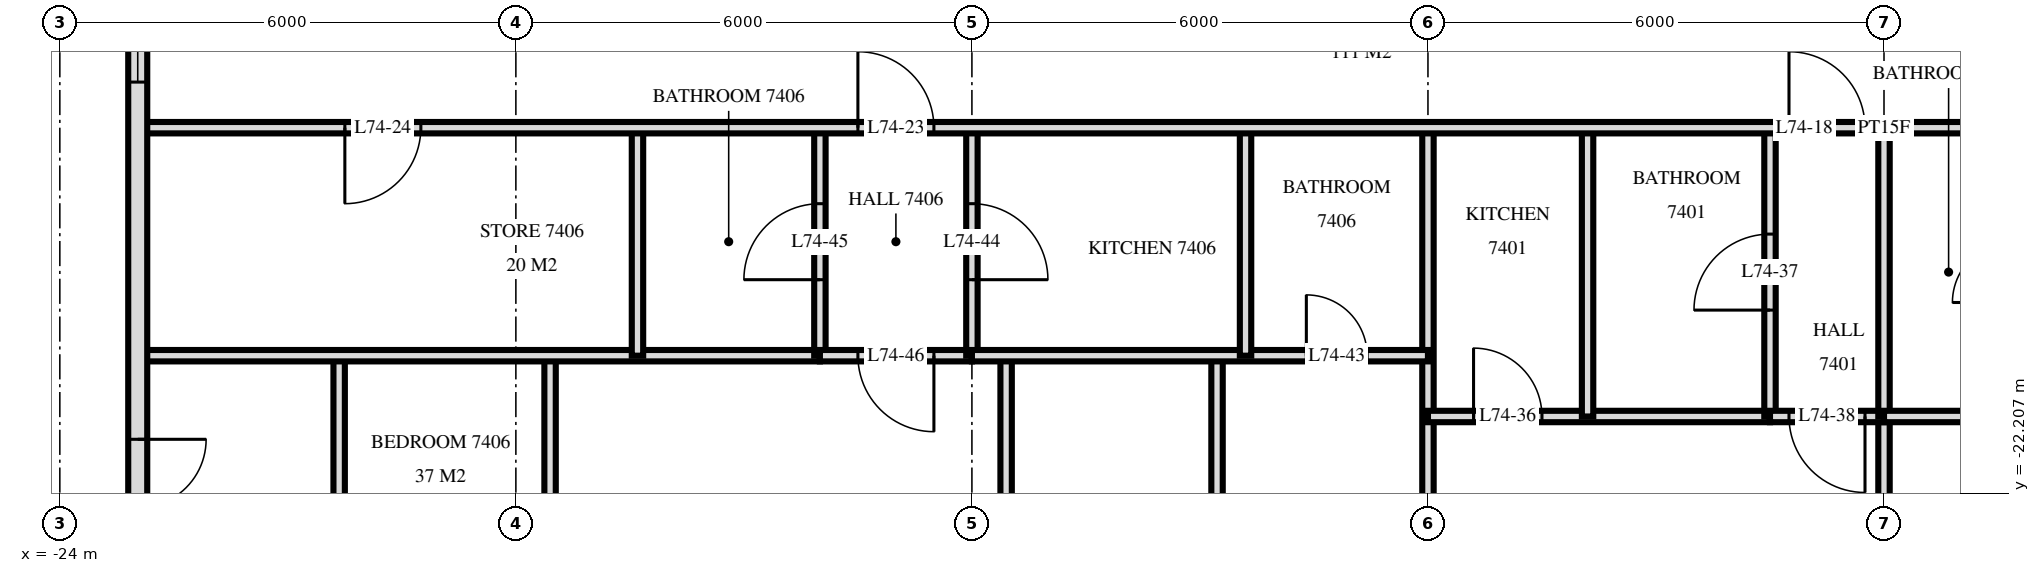
"""IFC4 building model, lengths in metres.
Left out: names, types, materials, properties, quantities, classifications, styles, units other than length and angle.
Written with IfcOpenShell. Run it as: python <this file> out.ifc"""

import sys

from ifc_helpers import new_model, si_unit, direction, frame, frame_2d, origin, place, context, subcontext, project, spatial, rectangle, extrude, element, fill, save


model = new_model("IFC4")
c1 = context("Model", 3, precision=1e-05, world=origin(), true_north=direction((0.0, 1.0)))
c2 = subcontext(c1, "Body", "Model", "MODEL_VIEW")
j1 = project(units=[si_unit("LENGTHUNIT", "METRE"), si_unit("PLANEANGLEUNIT", "RADIAN")], contexts=[c1])
p1 = place(None, origin())
s1 = spatial("IfcSite", under=j1, at=p1, CompositionType="ELEMENT")
p2 = place(p1, origin())
s2 = spatial("IfcBuilding", under=s1, at=p2, CompositionType="ELEMENT")
p3 = place(p2, frame((0.0, 0.0, 280.6)))
s3 = spatial("IfcBuildingStorey", under=s2, at=p3, CompositionType="ELEMENT", Elevation=280.6)
p4 = place(p3, frame((-22.975, -3.325, 0.0), z_axis=(0.0, 0.0, 1.0), x_axis=(0.0, -1.0, 0.0)))
e1 = element("IfcWall", 1, at=p4, inside=s3, PredefinedType="SOLIDWALL", context=c2, shape_type="SweptSolid", body=[
    extrude(rectangle(XDim=25.951, YDim=0.25, at=frame_2d((12.975, 0.0))), origin(), (0.0, 0.0, 1.0), 3.22),
])
p5 = place(p4, frame((3.225, 0.0, 0.0)))
e2 = element("IfcOpeningElement", 2, at=p5, cuts=e1, PredefinedType="OPENING", context=c2, shape_type="SweptSolid", body=[
    extrude(rectangle(XDim=1.8, YDim=2.4, at=frame_2d((0.9, 1.2))), frame((0.0, 0.135, 0.0), z_axis=(0.0, -1.0, 0.0), x_axis=(1.0, 0.0, 0.0)), (0.0, 0.0, 1.0), 0.27),
])
p6 = place(p4, frame((7.975, 0.0, 0.0)))
e3 = element("IfcOpeningElement", 3, at=p6, cuts=e1, PredefinedType="OPENING", context=c2, shape_type="SweptSolid", body=[
    extrude(rectangle(XDim=1.8, YDim=2.4, at=frame_2d((0.9, 1.2))), frame((0.0, 0.135, 0.0), z_axis=(0.0, -1.0, 0.0), x_axis=(1.0, 0.0, 0.0)), (0.0, 0.0, 1.0), 0.27),
])
p7 = place(p4, frame((12.275, 0.0, 0.9)))
e4 = element("IfcOpeningElement", 4, at=p7, cuts=e1, PredefinedType="OPENING", context=c2, shape_type="SweptSolid", body=[
    extrude(rectangle(XDim=1.2, YDim=1.5, at=frame_2d((0.6, 0.75))), frame((0.0, 0.135, 0.0), z_axis=(0.0, -1.0, 0.0), x_axis=(1.0, 0.0, 0.0)), (0.0, 0.0, 1.0), 0.27),
])
p8 = place(p4, frame((18.175, 0.0, 0.0)))
e5 = element("IfcOpeningElement", 5, at=p8, cuts=e1, PredefinedType="OPENING", context=c2, shape_type="SweptSolid", body=[
    extrude(rectangle(XDim=1.8, YDim=2.4, at=frame_2d((0.9, 1.2))), frame((0.0, 0.135, 0.0), z_axis=(0.0, -1.0, 0.0), x_axis=(1.0, 0.0, 0.0)), (0.0, 0.0, 1.0), 0.27),
])
p9 = place(p4, frame((21.075, 0.0, 0.0)))
e6 = element("IfcOpeningElement", 6, at=p9, cuts=e1, PredefinedType="OPENING", context=c2, shape_type="SweptSolid", body=[
    extrude(rectangle(XDim=1.8, YDim=2.4, at=frame_2d((0.9, 1.2))), frame((0.0, 0.135, 0.0), z_axis=(0.0, -1.0, 0.0), x_axis=(1.0, 0.0, 0.0)), (0.0, 0.0, 1.0), 0.27),
])
p10 = place(p4, frame((23.825, 0.0, 0.9)))
e7 = element("IfcOpeningElement", 7, at=p10, cuts=e1, PredefinedType="OPENING", context=c2, shape_type="SweptSolid", body=[
    extrude(rectangle(XDim=1.8, YDim=1.5, at=frame_2d((0.9, 0.75))), frame((0.0, 0.135, 0.0), z_axis=(0.0, -1.0, 0.0), x_axis=(1.0, 0.0, 0.0)), (0.0, 0.0, 1.0), 0.27),
])
p11 = place(p3, frame((0.0, -21.2, 0.0), z_axis=(0.0, 0.0, 1.0), x_axis=(0.0, 1.0, 0.0)))
e8 = element("IfcWall", 8, at=p11, inside=s3, PredefinedType="PARTITIONING", context=c2, shape_type="SweptSolid", body=[
    extrude(rectangle(XDim=3.8, YDim=0.15, at=frame_2d((1.9, 0.0))), origin(), (0.0, 0.0, 1.0), 3.22),
])
p12 = place(p3, frame((0.0, -33.62, 0.0), z_axis=(0.0, 0.0, 1.0), x_axis=(0.0, 1.0, 0.0)))
e9 = element("IfcWall", 9, at=p12, inside=s3, PredefinedType="PARTITIONING", context=c2, shape_type="SweptSolid", body=[
    extrude(rectangle(XDim=12.42, YDim=0.15, at=frame_2d((6.21, 0.0))), origin(), (0.0, 0.0, 1.0), 3.22),
])
p13 = place(p3, frame((-1.5, -21.2, 0.0), z_axis=(0.0, 0.0, 1.0), x_axis=(0.0, 1.0, 0.0)))
e10 = element("IfcWall", 10, at=p13, inside=s3, PredefinedType="PARTITIONING", context=c2, shape_type="SweptSolid", body=[
    extrude(rectangle(XDim=3.8, YDim=0.15, at=frame_2d((1.9, 0.0))), origin(), (0.0, 0.0, 1.0), 3.22),
])
p14 = place(p13, frame((1.4, 0.0, 0.0)))
e11 = element("IfcOpeningElement", 11, at=p14, cuts=e10, PredefinedType="OPENING", context=c2, shape_type="SweptSolid", body=[
    extrude(rectangle(XDim=1.0, YDim=2.1, at=frame_2d((0.5, 1.05))), frame((0.0, 0.085, 0.0), z_axis=(0.0, -1.0, 0.0), x_axis=(1.0, 0.0, 0.0)), (0.0, 0.0, 1.0), 0.17),
])
p15 = place(p3, frame((-3.9, -21.2, 0.0), z_axis=(0.0, 0.0, 1.0), x_axis=(0.0, 1.0, 0.0)))
e12 = element("IfcWall", 12, at=p15, inside=s3, PredefinedType="PARTITIONING", context=c2, shape_type="SweptSolid", body=[
    extrude(rectangle(XDim=3.8, YDim=0.15, at=frame_2d((1.9, 0.0))), origin(), (0.0, 0.0, 1.0), 3.22),
])
p16 = place(p3, frame((-6.0, -33.62, 0.0), z_axis=(0.0, 0.0, 1.0), x_axis=(0.0, 1.0, 0.0)))
e13 = element("IfcWall", 13, at=p16, inside=s3, PredefinedType="PARTITIONING", context=c2, shape_type="SweptSolid", body=[
    extrude(rectangle(XDim=16.22, YDim=0.15, at=frame_2d((8.11, 0.0))), origin(), (0.0, 0.0, 1.0), 3.22),
])
p17 = place(p3, frame((-8.4, -20.4, 0.0), z_axis=(0.0, 0.0, 1.0), x_axis=(0.0, 1.0, 0.0)))
e14 = element("IfcWall", 14, at=p17, inside=s3, PredefinedType="PARTITIONING", context=c2, shape_type="SweptSolid", body=[
    extrude(rectangle(XDim=3.0, YDim=0.15, at=frame_2d((1.5, 0.0))), origin(), (0.0, 0.0, 1.0), 3.22),
])
p18 = place(p3, frame((-8.775, -33.62, 0.0), z_axis=(0.0, 0.0, 1.0), x_axis=(0.0, 1.0, 0.0)))
e15 = element("IfcWall", 15, at=p18, inside=s3, PredefinedType="PARTITIONING", context=c2, shape_type="SweptSolid", body=[
    extrude(rectangle(XDim=13.22, YDim=0.15, at=frame_2d((6.61, 0.0))), origin(), (0.0, 0.0, 1.0), 3.22),
])
p19 = place(p18, frame((6.07, 0.0, 0.0)))
e16 = element("IfcOpeningElement", 16, at=p19, cuts=e15, PredefinedType="OPENING", context=c2, shape_type="SweptSolid", body=[
    extrude(rectangle(XDim=0.9, YDim=2.1, at=frame_2d((0.45, 1.05))), frame((0.0, 0.085, 0.0), z_axis=(0.0, -1.0, 0.0), x_axis=(1.0, 0.0, 0.0)), (0.0, 0.0, 1.0), 0.17),
])
p20 = place(p3, frame((-11.55, -33.62, 0.0), z_axis=(0.0, 0.0, 1.0), x_axis=(0.0, 1.0, 0.0)))
e17 = element("IfcWall", 17, at=p20, inside=s3, PredefinedType="PARTITIONING", context=c2, shape_type="SweptSolid", body=[
    extrude(rectangle(XDim=13.22, YDim=0.15, at=frame_2d((6.61, 0.0))), origin(), (0.0, 0.0, 1.0), 3.22),
])
p21 = place(p20, frame((6.05, 0.0, 0.0)))
e18 = element("IfcOpeningElement", 18, at=p21, cuts=e17, PredefinedType="OPENING", context=c2, shape_type="SweptSolid", body=[
    extrude(rectangle(XDim=0.9, YDim=2.1, at=frame_2d((0.45, 1.05))), frame((0.0, 0.085, 0.0), z_axis=(0.0, -1.0, 0.0), x_axis=(1.0, 0.0, 0.0)), (0.0, 0.0, 1.0), 0.17),
])
p22 = place(p3, frame((-12.0, -20.4, 0.0), z_axis=(0.0, 0.0, 1.0), x_axis=(0.0, 1.0, 0.0)))
e19 = element("IfcWall", 19, at=p22, inside=s3, PredefinedType="PARTITIONING", context=c2, shape_type="SweptSolid", body=[
    extrude(rectangle(XDim=3.0, YDim=0.15, at=frame_2d((1.5, 0.0))), origin(), (0.0, 0.0, 1.0), 3.22),
])
p23 = place(p22, frame((1.0, 0.0, 0.0)))
e20 = element("IfcOpeningElement", 20, at=p23, cuts=e19, PredefinedType="OPENING", context=c2, shape_type="SweptSolid", body=[
    extrude(rectangle(XDim=1.0, YDim=2.1, at=frame_2d((0.5, 1.05))), frame((0.0, 0.085, 0.0), z_axis=(0.0, -1.0, 0.0), x_axis=(1.0, 0.0, 0.0)), (0.0, 0.0, 1.0), 0.17),
])
p24 = place(p3, frame((-14.0, -20.4, 0.0), z_axis=(0.0, 0.0, 1.0), x_axis=(0.0, 1.0, 0.0)))
e21 = element("IfcWall", 21, at=p24, inside=s3, PredefinedType="PARTITIONING", context=c2, shape_type="SweptSolid", body=[
    extrude(rectangle(XDim=3.0, YDim=0.15, at=frame_2d((1.5, 0.0))), origin(), (0.0, 0.0, 1.0), 3.22),
])
p25 = place(p24, frame((1.0, 0.0, 0.0)))
e22 = element("IfcOpeningElement", 22, at=p25, cuts=e21, PredefinedType="OPENING", context=c2, shape_type="SweptSolid", body=[
    extrude(rectangle(XDim=1.0, YDim=2.1, at=frame_2d((0.5, 1.05))), frame((0.0, 0.085, 0.0), z_axis=(0.0, -1.0, 0.0), x_axis=(1.0, 0.0, 0.0)), (0.0, 0.0, 1.0), 0.17),
])
p26 = place(p3, frame((-16.4, -20.4, 0.0), z_axis=(0.0, 0.0, 1.0), x_axis=(0.0, 1.0, 0.0)))
e23 = element("IfcWall", 23, at=p26, inside=s3, PredefinedType="PARTITIONING", context=c2, shape_type="SweptSolid", body=[
    extrude(rectangle(XDim=3.0, YDim=0.15, at=frame_2d((1.5, 0.0))), origin(), (0.0, 0.0, 1.0), 3.22),
])
p27 = place(p3, frame((-17.55, -33.62, 0.0), z_axis=(0.0, 0.0, 1.0), x_axis=(0.0, 1.0, 0.0)))
e24 = element("IfcWall", 24, at=p27, inside=s3, PredefinedType="PARTITIONING", context=c2, shape_type="SweptSolid", body=[
    extrude(rectangle(XDim=13.22, YDim=0.15, at=frame_2d((6.61, 0.0))), origin(), (0.0, 0.0, 1.0), 3.22),
])
p28 = place(p27, frame((6.09, 0.0, 0.0)))
e25 = element("IfcOpeningElement", 25, at=p28, cuts=e24, PredefinedType="OPENING", context=c2, shape_type="SweptSolid", body=[
    extrude(rectangle(XDim=0.9, YDim=2.1, at=frame_2d((0.45, 1.05))), frame((0.0, 0.085, 0.0), z_axis=(0.0, -1.0, 0.0), x_axis=(1.0, 0.0, 0.0)), (0.0, 0.0, 1.0), 0.17),
])
p29 = place(p3, frame((-20.325, -33.239, 0.0), z_axis=(0.0, 0.0, 1.0), x_axis=(0.0, 1.0, 0.0)))
e26 = element("IfcWall", 26, at=p29, inside=s3, PredefinedType="PARTITIONING", context=c2, shape_type="SweptSolid", body=[
    extrude(rectangle(XDim=12.839, YDim=0.15, at=frame_2d((6.419, 0.0))), origin(), (0.0, 0.0, 1.0), 3.22),
])
p30 = place(p29, frame((5.853, 0.0, 0.0)))
e27 = element("IfcOpeningElement", 27, at=p30, cuts=e26, PredefinedType="OPENING", context=c2, shape_type="SweptSolid", body=[
    extrude(rectangle(XDim=0.9, YDim=2.1, at=frame_2d((0.45, 1.05))), frame((0.0, 0.085, 0.0), z_axis=(0.0, -1.0, 0.0), x_axis=(1.0, 0.0, 0.0)), (0.0, 0.0, 1.0), 0.17),
])
p31 = place(p3, frame((-1.5, -21.2, 0.0), z_axis=(0.0, 0.0, 1.0), x_axis=(1.0, 0.0, 0.0)))
e28 = element("IfcWall", 28, at=p31, inside=s3, PredefinedType="PARTITIONING", context=c2, shape_type="SweptSolid", body=[
    extrude(rectangle(XDim=1.5, YDim=0.15, at=frame_2d((0.75, 0.0))), origin(), (0.0, 0.0, 1.0), 3.22),
])
p32 = place(p31, frame((0.25, 0.0, 0.0)))
e29 = element("IfcOpeningElement", 29, at=p32, cuts=e28, PredefinedType="OPENING", context=c2, shape_type="SweptSolid", body=[
    extrude(rectangle(XDim=1.0, YDim=2.1, at=frame_2d((0.5, 1.05))), frame((0.0, 0.085, 0.0), z_axis=(0.0, -1.0, 0.0), x_axis=(1.0, 0.0, 0.0)), (0.0, 0.0, 1.0), 0.17),
])
p33 = place(p3, frame((-6.0, -21.2, 0.0), z_axis=(0.0, 0.0, 1.0), x_axis=(1.0, 0.0, 0.0)))
e30 = element("IfcWall", 30, at=p33, inside=s3, PredefinedType="PARTITIONING", context=c2, shape_type="SweptSolid", body=[
    extrude(rectangle(XDim=4.5, YDim=0.15, at=frame_2d((2.25, 0.0))), origin(), (0.0, 0.0, 1.0), 3.22),
])
p34 = place(p33, frame((0.6, 0.0, 0.0)))
e31 = element("IfcOpeningElement", 31, at=p34, cuts=e30, PredefinedType="OPENING", context=c2, shape_type="SweptSolid", body=[
    extrude(rectangle(XDim=0.9, YDim=2.1, at=frame_2d((0.45, 1.05))), frame((0.0, 0.085, 0.0), z_axis=(0.0, -1.0, 0.0), x_axis=(1.0, 0.0, 0.0)), (0.0, 0.0, 1.0), 0.17),
])
p35 = place(p3, frame((0.0, -21.2, 0.0), z_axis=(0.0, 0.0, 1.0), x_axis=(1.0, 0.0, 0.0)))
e32 = element("IfcWall", 32, at=p35, inside=s3, PredefinedType="PARTITIONING", context=c2, shape_type="SweptSolid", body=[
    extrude(rectangle(XDim=1.7, YDim=0.15, at=frame_2d((0.85, 0.0))), origin(), (0.0, 0.0, 1.0), 3.22),
])
p36 = place(p3, frame((-14.0, -20.4, 0.0), z_axis=(0.0, 0.0, 1.0), x_axis=(1.0, 0.0, 0.0)))
e33 = element("IfcWall", 33, at=p36, inside=s3, PredefinedType="PARTITIONING", context=c2, shape_type="SweptSolid", body=[
    extrude(rectangle(XDim=2.0, YDim=0.15, at=frame_2d((1.0, 0.0))), origin(), (0.0, 0.0, 1.0), 3.22),
])
p37 = place(p36, frame((0.5, 0.0, 0.0)))
e34 = element("IfcOpeningElement", 34, at=p37, cuts=e33, PredefinedType="OPENING", context=c2, shape_type="SweptSolid", body=[
    extrude(rectangle(XDim=1.0, YDim=2.1, at=frame_2d((0.5, 1.05))), frame((0.0, 0.085, 0.0), z_axis=(0.0, -1.0, 0.0), x_axis=(1.0, 0.0, 0.0)), (0.0, 0.0, 1.0), 0.17),
])
p38 = place(p3, frame((-22.92, -20.4, 0.0), z_axis=(0.0, 0.0, 1.0), x_axis=(1.0, 0.0, 0.0)))
e35 = element("IfcWall", 35, at=p38, inside=s3, PredefinedType="PARTITIONING", context=c2, shape_type="SweptSolid", body=[
    extrude(rectangle(XDim=8.92, YDim=0.15, at=frame_2d((4.46, 0.0))), origin(), (0.0, 0.0, 1.0), 3.22),
])
p39 = place(p3, frame((-12.0, -20.4, 0.0), z_axis=(0.0, 0.0, 1.0), x_axis=(1.0, 0.0, 0.0)))
e36 = element("IfcWall", 36, at=p39, inside=s3, PredefinedType="PARTITIONING", context=c2, shape_type="SweptSolid", body=[
    extrude(rectangle(XDim=6.0, YDim=0.15, at=frame_2d((3.0, 0.0))), origin(), (0.0, 0.0, 1.0), 3.22),
])
p40 = place(p39, frame((4.4, 0.0, 0.0)))
e37 = element("IfcOpeningElement", 37, at=p40, cuts=e36, PredefinedType="OPENING", context=c2, shape_type="SweptSolid", body=[
    extrude(rectangle(XDim=0.8, YDim=2.1, at=frame_2d((0.4, 1.05))), frame((0.0, 0.085, 0.0), z_axis=(0.0, -1.0, 0.0), x_axis=(1.0, 0.0, 0.0)), (0.0, 0.0, 1.0), 0.17),
])
p41 = place(p3, frame((-22.92, -17.4, 0.0), z_axis=(0.0, 0.0, 1.0), x_axis=(1.0, 0.0, 0.0)))
e38 = element("IfcWall", 38, at=p41, inside=s3, PredefinedType="PARTITIONING", context=c2, shape_type="SweptSolid", body=[
    extrude(rectangle(XDim=45.84, YDim=0.15, at=frame_2d((22.92, 0.0))), origin(), (0.0, 0.0, 1.0), 3.22),
])
p42 = place(p41, frame((21.67, 0.0, 0.0)))
e39 = element("IfcOpeningElement", 39, at=p42, cuts=e38, PredefinedType="OPENING", context=c2, shape_type="SweptSolid", body=[
    extrude(rectangle(XDim=1.0, YDim=2.1, at=frame_2d((0.5, 1.05))), frame((0.0, 0.085, 0.0), z_axis=(0.0, -1.0, 0.0), x_axis=(1.0, 0.0, 0.0)), (0.0, 0.0, 1.0), 0.17),
])
p43 = place(p41, frame((24.77, 0.0, 0.0)))
e40 = element("IfcOpeningElement", 40, at=p43, cuts=e38, PredefinedType="OPENING", context=c2, shape_type="SweptSolid", body=[
    extrude(rectangle(XDim=1.0, YDim=2.1, at=frame_2d((0.5, 1.05))), frame((0.0, 0.085, 0.0), z_axis=(0.0, -1.0, 0.0), x_axis=(1.0, 0.0, 0.0)), (0.0, 0.0, 1.0), 0.17),
])
p44 = place(p41, frame((26.07, 0.0, 0.0)))
e41 = element("IfcOpeningElement", 41, at=p44, cuts=e38, PredefinedType="OPENING", context=c2, shape_type="SweptSolid", body=[
    extrude(rectangle(XDim=1.0, YDim=2.1, at=frame_2d((0.5, 1.05))), frame((0.0, 0.085, 0.0), z_axis=(0.0, -1.0, 0.0), x_axis=(1.0, 0.0, 0.0)), (0.0, 0.0, 1.0), 0.17),
])
p45 = place(p41, frame((30.77, 0.0, 0.0)))
e42 = element("IfcOpeningElement", 42, at=p45, cuts=e38, PredefinedType="OPENING", context=c2, shape_type="SweptSolid", body=[
    extrude(rectangle(XDim=1.0, YDim=2.1, at=frame_2d((0.5, 1.05))), frame((0.0, 0.085, 0.0), z_axis=(0.0, -1.0, 0.0), x_axis=(1.0, 0.0, 0.0)), (0.0, 0.0, 1.0), 0.17),
])
p46 = place(p41, frame((32.07, 0.0, 0.0)))
e43 = element("IfcOpeningElement", 43, at=p46, cuts=e38, PredefinedType="OPENING", context=c2, shape_type="SweptSolid", body=[
    extrude(rectangle(XDim=1.0, YDim=2.1, at=frame_2d((0.5, 1.05))), frame((0.0, 0.085, 0.0), z_axis=(0.0, -1.0, 0.0), x_axis=(1.0, 0.0, 0.0)), (0.0, 0.0, 1.0), 0.17),
])
p47 = place(p41, frame((9.42, 0.0, 0.0)))
e44 = element("IfcOpeningElement", 44, at=p47, cuts=e38, PredefinedType="OPENING", context=c2, shape_type="SweptSolid", body=[
    extrude(rectangle(XDim=1.0, YDim=2.1, at=frame_2d((0.5, 1.05))), frame((0.0, 0.085, 0.0), z_axis=(0.0, -1.0, 0.0), x_axis=(1.0, 0.0, 0.0)), (0.0, 0.0, 1.0), 0.17),
])
p48 = place(p41, frame((2.67, 0.0, 0.0)))
e45 = element("IfcOpeningElement", 45, at=p48, cuts=e38, PredefinedType="OPENING", context=c2, shape_type="SweptSolid", body=[
    extrude(rectangle(XDim=1.0, YDim=2.1, at=frame_2d((0.5, 1.05))), frame((0.0, 0.085, 0.0), z_axis=(0.0, -1.0, 0.0), x_axis=(1.0, 0.0, 0.0)), (0.0, 0.0, 1.0), 0.17),
])
p49 = place(p41, frame((37.82, 0.0, 0.0)))
e46 = element("IfcOpeningElement", 46, at=p49, cuts=e38, PredefinedType="OPENING", context=c2, shape_type="SweptSolid", body=[
    extrude(rectangle(XDim=1.0, YDim=2.1, at=frame_2d((0.5, 1.05))), frame((0.0, 0.085, 0.0), z_axis=(0.0, -1.0, 0.0), x_axis=(1.0, 0.0, 0.0)), (0.0, 0.0, 1.0), 0.17),
])
p50 = place(p7, origin())
e47 = element("IfcWindow", 47, at=p50, inside=s3, PartitioningType="SINGLE_PANEL", PredefinedType="WINDOW", context=c2, shape_type="SweptSolid", body=[
    extrude(rectangle(XDim=1.2, YDim=1.5, at=frame_2d((0.6, 0.75))), frame((0.0, 0.03, 0.0), z_axis=(0.0, -1.0, 0.0), x_axis=(1.0, 0.0, 0.0)), (0.0, 0.0, 1.0), 0.06),
])
fill(e4, e47)
p51 = place(p8, origin())
e48 = element("IfcDoor", 48, at=p51, inside=s3, OperationType="DOUBLE_DOOR_SINGLE_SWING", PredefinedType="DOOR", context=c2, shape_type="SweptSolid", body=[
    extrude(rectangle(XDim=1.8, YDim=2.4, at=frame_2d((0.9, 1.2))), frame((0.0, 0.025, 0.0), z_axis=(0.0, -1.0, 0.0), x_axis=(1.0, 0.0, 0.0)), (0.0, 0.0, 1.0), 0.05),
])
fill(e5, e48)
p52 = place(p42, origin())
e49 = element("IfcDoor", 49, at=p52, inside=s3, OperationType="SINGLE_SWING_RIGHT", PredefinedType="DOOR", context=c2, shape_type="SweptSolid", body=[
    extrude(rectangle(XDim=1.0, YDim=2.1, at=frame_2d((0.5, 1.05))), frame((0.0, 0.025, 0.0), z_axis=(0.0, -1.0, 0.0), x_axis=(1.0, 0.0, 0.0)), (0.0, 0.0, 1.0), 0.05),
])
fill(e39, e49)
p53 = place(p47, origin())
e50 = element("IfcDoor", 50, at=p53, inside=s3, OperationType="SINGLE_SWING_RIGHT", PredefinedType="DOOR", context=c2, shape_type="SweptSolid", body=[
    extrude(rectangle(XDim=1.0, YDim=2.1, at=frame_2d((0.5, 1.05))), frame((0.0, 0.025, 0.0), z_axis=(0.0, -1.0, 0.0), x_axis=(1.0, 0.0, 0.0)), (0.0, 0.0, 1.0), 0.05),
])
fill(e44, e50)
p54 = place(p48, frame((0.5, 0.0, 0.0), z_axis=(0.0, 0.0, 1.0), x_axis=(-1.0, 0.0, 0.0)))
e51 = element("IfcDoor", 51, at=p54, inside=s3, OperationType="SINGLE_SWING_LEFT", PredefinedType="DOOR", context=c2, shape_type="SweptSolid", body=[
    extrude(rectangle(XDim=1.0, YDim=2.1, at=frame_2d((0.0, 1.05))), frame((0.0, -0.025, 0.0), z_axis=(0.0, 1.0, 0.0), x_axis=(-1.0, 0.0, 0.0)), (0.0, 0.0, 1.0), 0.05),
])
fill(e45, e51)
p55 = place(p34, origin())
e52 = element("IfcDoor", 52, at=p55, inside=s3, OperationType="SINGLE_SWING_RIGHT", PredefinedType="DOOR", context=c2, shape_type="SweptSolid", body=[
    extrude(rectangle(XDim=0.9, YDim=2.1, at=frame_2d((0.45, 1.05))), frame((0.0, 0.025, 0.0), z_axis=(0.0, -1.0, 0.0), x_axis=(1.0, 0.0, 0.0)), (0.0, 0.0, 1.0), 0.05),
])
fill(e31, e52)
p56 = place(p14, origin())
e53 = element("IfcDoor", 53, at=p56, inside=s3, OperationType="SINGLE_SWING_RIGHT", PredefinedType="DOOR", context=c2, shape_type="SweptSolid", body=[
    extrude(rectangle(XDim=1.0, YDim=2.1, at=frame_2d((0.5, 1.05))), frame((0.0, 0.025, 0.0), z_axis=(0.0, -1.0, 0.0), x_axis=(1.0, 0.0, 0.0)), (0.0, 0.0, 1.0), 0.05),
])
fill(e11, e53)
p57 = place(p32, frame((0.5, 0.0, 0.0), z_axis=(0.0, 0.0, 1.0), x_axis=(-1.0, 0.0, 0.0)))
e54 = element("IfcDoor", 54, at=p57, inside=s3, OperationType="SINGLE_SWING_RIGHT", PredefinedType="DOOR", context=c2, shape_type="SweptSolid", body=[
    extrude(rectangle(XDim=1.0, YDim=2.1, at=frame_2d((0.0, 1.05))), frame((0.0, -0.025, 0.0), z_axis=(0.0, 1.0, 0.0), x_axis=(-1.0, 0.0, 0.0)), (0.0, 0.0, 1.0), 0.05),
])
fill(e29, e54)
p58 = place(p40, origin())
e55 = element("IfcDoor", 55, at=p58, inside=s3, OperationType="SINGLE_SWING_RIGHT", PredefinedType="DOOR", context=c2, shape_type="SweptSolid", body=[
    extrude(rectangle(XDim=0.8, YDim=2.1, at=frame_2d((0.4, 1.05))), frame((0.0, 0.025, 0.0), z_axis=(0.0, -1.0, 0.0), x_axis=(1.0, 0.0, 0.0)), (0.0, 0.0, 1.0), 0.05),
])
fill(e37, e55)
p59 = place(p23, frame((0.5, 0.0, 0.0), z_axis=(0.0, 0.0, 1.0), x_axis=(-1.0, 0.0, 0.0)))
e56 = element("IfcDoor", 56, at=p59, inside=s3, OperationType="SINGLE_SWING_LEFT", PredefinedType="DOOR", context=c2, shape_type="SweptSolid", body=[
    extrude(rectangle(XDim=1.0, YDim=2.1, at=frame_2d((0.0, 1.05))), frame((0.0, -0.025, 0.0), z_axis=(0.0, 1.0, 0.0), x_axis=(-1.0, 0.0, 0.0)), (0.0, 0.0, 1.0), 0.05),
])
fill(e20, e56)
p60 = place(p25, origin())
e57 = element("IfcDoor", 57, at=p60, inside=s3, OperationType="SINGLE_SWING_RIGHT", PredefinedType="DOOR", context=c2, shape_type="SweptSolid", body=[
    extrude(rectangle(XDim=1.0, YDim=2.1, at=frame_2d((0.5, 1.05))), frame((0.0, 0.025, 0.0), z_axis=(0.0, -1.0, 0.0), x_axis=(1.0, 0.0, 0.0)), (0.0, 0.0, 1.0), 0.05),
])
fill(e22, e57)
p61 = place(p37, frame((0.5, 0.0, 0.0), z_axis=(0.0, 0.0, 1.0), x_axis=(-1.0, 0.0, 0.0)))
e58 = element("IfcDoor", 58, at=p61, inside=s3, OperationType="SINGLE_SWING_RIGHT", PredefinedType="DOOR", context=c2, shape_type="SweptSolid", body=[
    extrude(rectangle(XDim=1.0, YDim=2.1, at=frame_2d((0.0, 1.05))), frame((0.0, -0.025, 0.0), z_axis=(0.0, 1.0, 0.0), x_axis=(-1.0, 0.0, 0.0)), (0.0, 0.0, 1.0), 0.05),
])
fill(e34, e58)
save(model, sys.argv[1])
